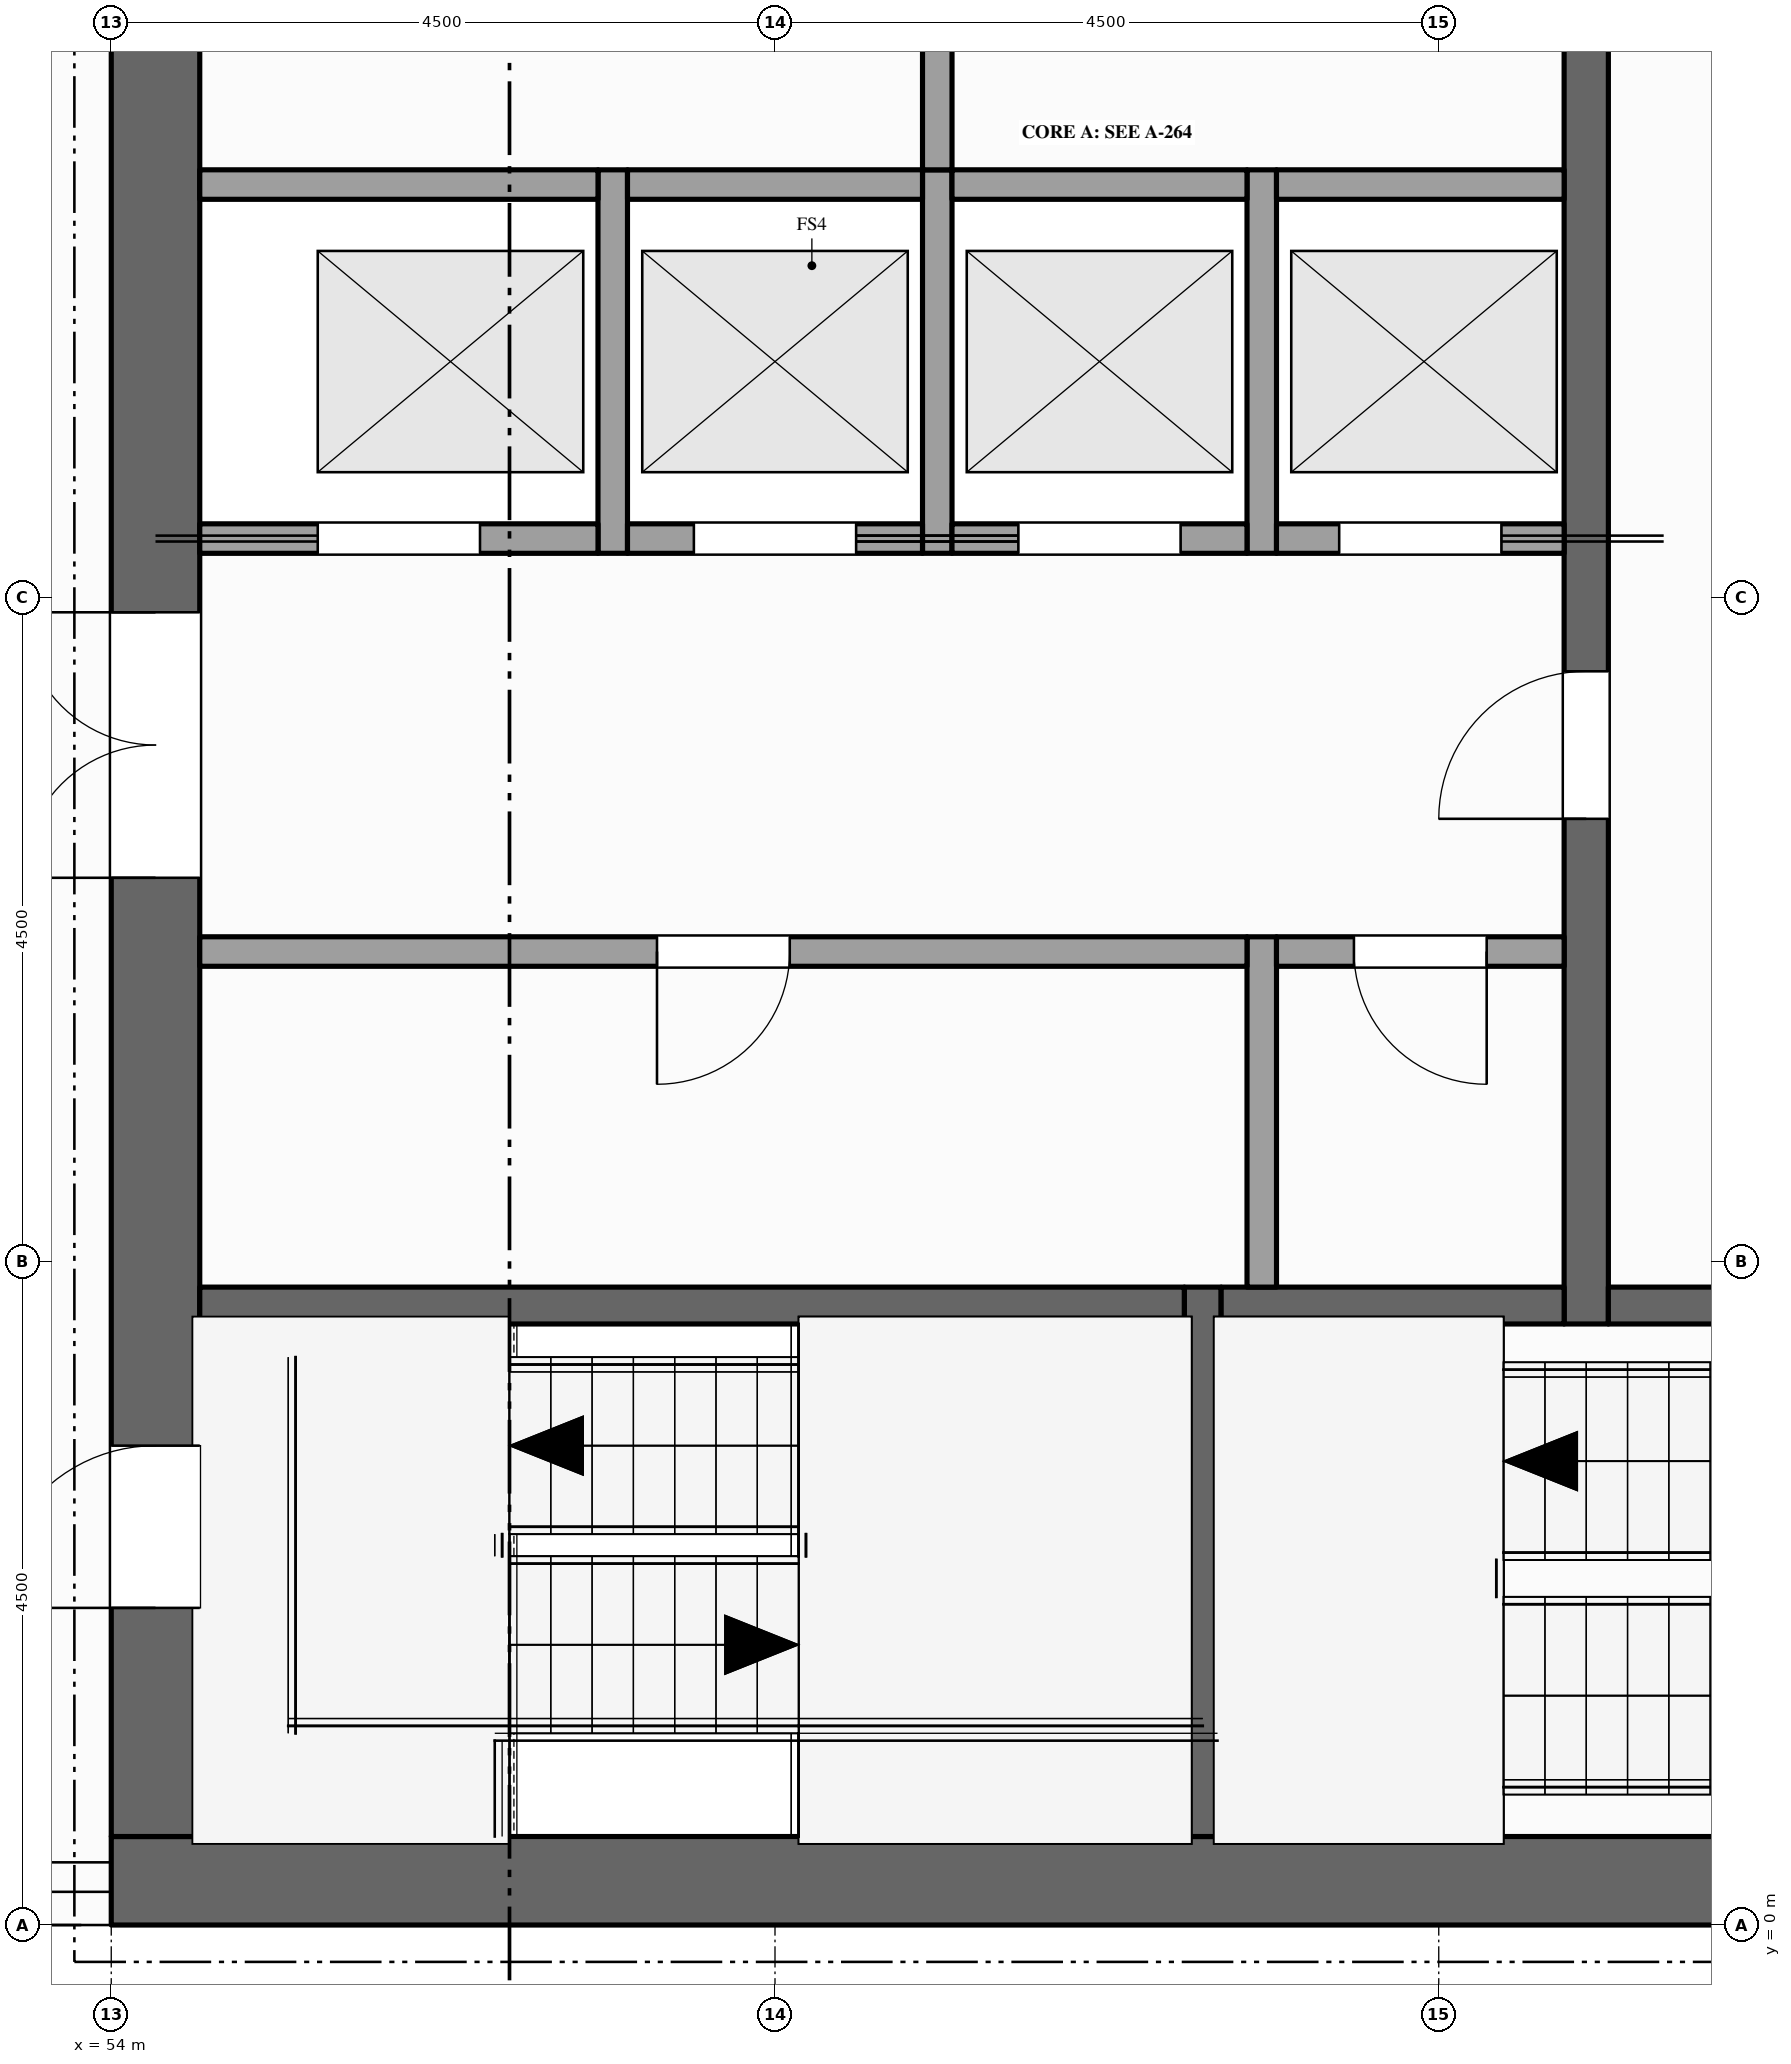
"""IFC4 building model, lengths in metres.
Left out: names, types, materials, properties, quantities, classifications, styles, units other than length and angle.
Written with IfcOpenShell. Run it as: python <this file> out.ifc"""

import sys

from ifc_helpers import new_model, si_unit, direction, frame, frame_2d, origin, place, context, subcontext, project, spatial, rectangle, extrude, element, fill, save


model = new_model("IFC4")
c1 = context("Model", 3, precision=1e-05, world=origin(), true_north=direction((0.0, 1.0)))
c2 = subcontext(c1, "Body", "Model", "MODEL_VIEW")
j1 = project(units=[si_unit("LENGTHUNIT", "METRE"), si_unit("PLANEANGLEUNIT", "RADIAN")], contexts=[c1])
p1 = place(None, origin())
s1 = spatial("IfcSite", under=j1, at=p1, CompositionType="ELEMENT")
p2 = place(p1, origin())
s2 = spatial("IfcBuilding", under=s1, at=p2, CompositionType="ELEMENT")
p3 = place(p2, frame((0.0, 0.0, 350.5)))
s3 = spatial("IfcBuildingStorey", under=s2, at=p3, CompositionType="ELEMENT", Elevation=350.5)
p4 = place(p3, frame((67.5, 0.3, -0.15), z_axis=(0.0, 0.0, 1.0), x_axis=(-1.0, 0.0, 0.0)))
e1 = element("IfcWall", 1, at=p4, inside=s3, PredefinedType="SHEAR", context=c2, shape_type="SweptSolid", body=[
    extrude(rectangle(XDim=13.5, YDim=0.6, at=frame_2d((6.75, 0.0))), origin(), (0.0, 0.0, 1.0), 5.0),
])
p5 = place(p3, frame((54.3, 0.6, -0.15), z_axis=(0.0, 0.0, 1.0), x_axis=(0.0, 1.0, 0.0)))
e2 = element("IfcWall", 2, at=p5, inside=s3, PredefinedType="SHEAR", context=c2, shape_type="SweptSolid", body=[
    extrude(rectangle(XDim=21.3, YDim=0.6, at=frame_2d((10.65, 0.0))), origin(), (0.0, 0.0, 1.0), 5.0),
])
p6 = place(p5, frame((6.5, 0.0, 0.15)))
e3 = element("IfcOpeningElement", 3, at=p6, cuts=e2, PredefinedType="OPENING", context=c2, shape_type="SweptSolid", body=[
    extrude(rectangle(XDim=1.8, YDim=2.1, at=frame_2d((0.9, 1.05))), frame((0.0, 0.31, 0.0), z_axis=(0.0, -1.0, 0.0), x_axis=(1.0, 0.0, 0.0)), (0.0, 0.0, 1.0), 0.62),
])
p7 = place(p5, frame((12.55, 0.0, 0.15)))
e4 = element("IfcOpeningElement", 4, at=p7, cuts=e2, PredefinedType="OPENING", context=c2, shape_type="SweptSolid", body=[
    extrude(rectangle(XDim=1.1, YDim=2.1, at=frame_2d((0.55, 1.05))), frame((0.0, 0.31, 0.0), z_axis=(0.0, -1.0, 0.0), x_axis=(1.0, 0.0, 0.0)), (0.0, 0.0, 1.0), 0.62),
])
p8 = place(p5, frame((1.55, 0.0, 0.15)))
e5 = element("IfcOpeningElement", 5, at=p8, cuts=e2, PredefinedType="OPENING", context=c2, shape_type="SweptSolid", body=[
    extrude(rectangle(XDim=1.1, YDim=2.1, at=frame_2d((0.55, 1.05))), frame((0.0, 0.31, 0.0), z_axis=(0.0, -1.0, 0.0), x_axis=(1.0, 0.0, 0.0)), (0.0, 0.0, 1.0), 0.62),
])
p9 = place(p5, frame((18.75, 0.0, 0.15)))
e6 = element("IfcOpeningElement", 6, at=p9, cuts=e2, PredefinedType="OPENING", context=c2, shape_type="SweptSolid", body=[
    extrude(rectangle(XDim=1.1, YDim=2.1, at=frame_2d((0.55, 1.05))), frame((0.0, 0.31, 0.0), z_axis=(0.0, -1.0, 0.0), x_axis=(1.0, 0.0, 0.0)), (0.0, 0.0, 1.0), 0.62),
])
for number, where, z_axis, x_axis in (
    (7, (57.4, 9.3, 0.0), (0.0, 0.0, 1.0), (0.0, 1.0, 0.0)),
    (8, (59.6, 9.3, 0.0), (0.0, 0.0, 1.0), (0.0, 1.0, 0.0)),
):
    element("IfcWall", number, at=place(p3, frame(where, z_axis=z_axis, x_axis=x_axis)), inside=s3, PredefinedType="SOLIDWALL", context=c2, shape_type="SweptSolid", body=[
        extrude(rectangle(XDim=2.6, YDim=0.2, at=frame_2d((1.3, 0.0))), origin(), (0.0, 0.0, 1.0), 4.75),
    ])
p10 = place(p3, frame((59.6, 11.9, 0.0), z_axis=(0.0, 0.0, 1.0), x_axis=(0.0, 1.0, 0.0)))
e9 = element("IfcWall", 9, at=p10, inside=s3, PredefinedType="PARTITIONING", context=c2, shape_type="SweptSolid", body=[
    extrude(rectangle(XDim=3.6, YDim=0.2, at=frame_2d((1.8, 0.0))), origin(), (0.0, 0.0, 1.0), 4.75),
])
p11 = place(p10, frame((1.3, 0.0, 0.0)))
e10 = element("IfcOpeningElement", 10, at=p11, cuts=e9, PredefinedType="OPENING", context=c2, shape_type="SweptSolid", body=[
    extrude(rectangle(XDim=1.0, YDim=2.1, at=frame_2d((0.5, 1.05))), frame((0.0, 0.11, 0.0), z_axis=(0.0, -1.0, 0.0), x_axis=(1.0, 0.0, 0.0)), (0.0, 0.0, 1.0), 0.22),
])
p12 = place(p3, frame((61.4, 0.6, 0.0), z_axis=(0.0, 0.0, 1.0), x_axis=(0.0, 1.0, 0.0)))
e11 = element("IfcWall", 11, at=p12, inside=s3, PredefinedType="SHEAR", context=c2, shape_type="SweptSolid", body=[
    extrude(rectangle(XDim=3.725, YDim=0.25, at=frame_2d((1.862, 0.0))), origin(), (0.0, 0.0, 1.0), 4.75),
])
p13 = place(p3, frame((61.8, 4.325, 0.0), z_axis=(0.0, 0.0, 1.0), x_axis=(0.0, 1.0, 0.0)))
e12 = element("IfcWall", 12, at=p13, inside=s3, PredefinedType="PARTITIONING", context=c2, shape_type="SweptSolid", body=[
    extrude(rectangle(XDim=2.375, YDim=0.2, at=frame_2d((1.188, 0.0))), origin(), (0.0, 0.0, 1.0), 4.75),
])
p14 = place(p3, frame((61.8, 9.3, 0.0), z_axis=(0.0, 0.0, 1.0), x_axis=(0.0, 1.0, 0.0)))
e13 = element("IfcWall", 13, at=p14, inside=s3, PredefinedType="SOLIDWALL", context=c2, shape_type="SweptSolid", body=[
    extrude(rectangle(XDim=2.6, YDim=0.2, at=frame_2d((1.3, 0.0))), origin(), (0.0, 0.0, 1.0), 4.75),
])
p15 = place(p3, frame((64.0, 4.075, 0.0), z_axis=(0.0, 0.0, 1.0), x_axis=(0.0, 1.0, 0.0)))
e14 = element("IfcWall", 14, at=p15, inside=s3, PredefinedType="SHEAR", context=c2, shape_type="SweptSolid", body=[
    extrude(rectangle(XDim=14.525, YDim=0.3, at=frame_2d((7.263, 0.0))), origin(), (0.0, 0.0, 1.0), 4.75),
])
p16 = place(p15, frame((3.425, 0.0, 0.0)))
e15 = element("IfcOpeningElement", 15, at=p16, cuts=e14, PredefinedType="OPENING", context=c2, shape_type="SweptSolid", body=[
    extrude(rectangle(XDim=1.0, YDim=2.1, at=frame_2d((0.5, 1.05))), frame((0.0, 0.16, 0.0), z_axis=(0.0, -1.0, 0.0), x_axis=(1.0, 0.0, 0.0)), (0.0, 0.0, 1.0), 0.32),
])
p17 = place(p15, frame((9.125, 0.0, 0.0)))
e16 = element("IfcOpeningElement", 16, at=p17, cuts=e14, PredefinedType="OPENING", context=c2, shape_type="SweptSolid", body=[
    extrude(rectangle(XDim=1.0, YDim=2.1, at=frame_2d((0.5, 1.05))), frame((0.0, 0.16, 0.0), z_axis=(0.0, -1.0, 0.0), x_axis=(1.0, 0.0, 0.0)), (0.0, 0.0, 1.0), 0.32),
])
p18 = place(p3, frame((54.6, 4.2, 0.0), z_axis=(0.0, 0.0, 1.0), x_axis=(1.0, 0.0, 0.0)))
e17 = element("IfcWall", 17, at=p18, inside=s3, PredefinedType="SHEAR", context=c2, shape_type="SweptSolid", body=[
    extrude(rectangle(XDim=6.675, YDim=0.25, at=frame_2d((3.337, 0.0))), origin(), (0.0, 0.0, 1.0), 4.75),
])
p19 = place(p3, frame((61.525, 4.2, 0.0), z_axis=(0.0, 0.0, 1.0), x_axis=(1.0, 0.0, 0.0)))
e18 = element("IfcWall", 18, at=p19, inside=s3, PredefinedType="SHEAR", context=c2, shape_type="SweptSolid", body=[
    extrude(rectangle(XDim=2.325, YDim=0.25, at=frame_2d((1.163, 0.0))), origin(), (0.0, 0.0, 1.0), 4.75),
])
p20 = place(p3, frame((64.15, 4.2, 0.0), z_axis=(0.0, 0.0, 1.0), x_axis=(1.0, 0.0, 0.0)))
e19 = element("IfcWall", 19, at=p20, inside=s3, PredefinedType="SHEAR", context=c2, shape_type="SweptSolid", body=[
    extrude(rectangle(XDim=2.75, YDim=0.25, at=frame_2d((1.375, 0.0))), origin(), (0.0, 0.0, 1.0), 4.75),
])
p21 = place(p20, frame((1.4, 0.0, 0.0)))
e20 = element("IfcOpeningElement", 20, at=p21, cuts=e19, PredefinedType="OPENING", context=c2, shape_type="SweptSolid", body=[
    extrude(rectangle(XDim=1.1, YDim=2.1, at=frame_2d((0.55, 1.05))), frame((0.0, 0.135, 0.0), z_axis=(0.0, -1.0, 0.0), x_axis=(1.0, 0.0, 0.0)), (0.0, 0.0, 1.0), 0.27),
])
p22 = place(p3, frame((54.6, 6.6, 0.0), z_axis=(0.0, 0.0, 1.0), x_axis=(1.0, 0.0, 0.0)))
e21 = element("IfcWall", 21, at=p22, inside=s3, PredefinedType="PARTITIONING", context=c2, shape_type="SweptSolid", body=[
    extrude(rectangle(XDim=7.1, YDim=0.2, at=frame_2d((3.55, 0.0))), origin(), (0.0, 0.0, 1.0), 4.75),
])
p23 = place(p22, frame((3.1, 0.0, 0.0)))
e22 = element("IfcOpeningElement", 22, at=p23, cuts=e21, PredefinedType="OPENING", context=c2, shape_type="SweptSolid", body=[
    extrude(rectangle(XDim=0.9, YDim=2.1, at=frame_2d((0.45, 1.05))), frame((0.0, 0.11, 0.0), z_axis=(0.0, -1.0, 0.0), x_axis=(1.0, 0.0, 0.0)), (0.0, 0.0, 1.0), 0.22),
])
p24 = place(p3, frame((61.9, 6.6, 0.0), z_axis=(0.0, 0.0, 1.0), x_axis=(1.0, 0.0, 0.0)))
e23 = element("IfcWall", 23, at=p24, inside=s3, PredefinedType="PARTITIONING", context=c2, shape_type="SweptSolid", body=[
    extrude(rectangle(XDim=1.95, YDim=0.2, at=frame_2d((0.975, 0.0))), origin(), (0.0, 0.0, 1.0), 4.75),
])
p25 = place(p24, frame((0.525, 0.0, 0.0)))
e24 = element("IfcOpeningElement", 24, at=p25, cuts=e23, PredefinedType="OPENING", context=c2, shape_type="SweptSolid", body=[
    extrude(rectangle(XDim=0.9, YDim=2.1, at=frame_2d((0.45, 1.05))), frame((0.0, 0.11, 0.0), z_axis=(0.0, -1.0, 0.0), x_axis=(1.0, 0.0, 0.0)), (0.0, 0.0, 1.0), 0.22),
])
p26 = place(p3, frame((54.6, 9.4, 0.0), z_axis=(0.0, 0.0, 1.0), x_axis=(1.0, 0.0, 0.0)))
e25 = element("IfcWall", 25, at=p26, inside=s3, PredefinedType="SOLIDWALL", context=c2, shape_type="SweptSolid", body=[
    extrude(rectangle(XDim=2.7, YDim=0.2, at=frame_2d((1.35, 0.0))), origin(), (0.0, 0.0, 1.0), 4.75),
])
p27 = place(p26, frame((0.8, 0.0, 0.012)))
e26 = element("IfcOpeningElement", 26, at=p27, cuts=e25, PredefinedType="OPENING", context=c2, shape_type="SweptSolid", body=[
    extrude(rectangle(XDim=1.1, YDim=2.1, at=frame_2d((0.55, 1.05))), frame((0.0, 0.11, 0.0), z_axis=(0.0, -1.0, 0.0), x_axis=(1.0, 0.0, 0.0)), (0.0, 0.0, 1.0), 0.22),
])
p28 = place(p3, frame((57.5, 9.4, 0.0), z_axis=(0.0, 0.0, 1.0), x_axis=(1.0, 0.0, 0.0)))
e27 = element("IfcWall", 27, at=p28, inside=s3, PredefinedType="SOLIDWALL", context=c2, shape_type="SweptSolid", body=[
    extrude(rectangle(XDim=2.0, YDim=0.2, at=frame_2d((1.0, 0.0))), origin(), (0.0, 0.0, 1.0), 4.75),
])
p29 = place(p28, frame((0.45, 0.0, 0.012)))
e28 = element("IfcOpeningElement", 28, at=p29, cuts=e27, PredefinedType="OPENING", context=c2, shape_type="SweptSolid", body=[
    extrude(rectangle(XDim=1.1, YDim=2.1, at=frame_2d((0.55, 1.05))), frame((0.0, 0.11, 0.0), z_axis=(0.0, -1.0, 0.0), x_axis=(1.0, 0.0, 0.0)), (0.0, 0.0, 1.0), 0.22),
])
p30 = place(p3, frame((59.7, 9.4, 0.0), z_axis=(0.0, 0.0, 1.0), x_axis=(1.0, 0.0, 0.0)))
e29 = element("IfcWall", 29, at=p30, inside=s3, PredefinedType="SOLIDWALL", context=c2, shape_type="SweptSolid", body=[
    extrude(rectangle(XDim=2.0, YDim=0.2, at=frame_2d((1.0, 0.0))), origin(), (0.0, 0.0, 1.0), 4.75),
])
p31 = place(p30, frame((0.45, 0.0, 0.012)))
e30 = element("IfcOpeningElement", 30, at=p31, cuts=e29, PredefinedType="OPENING", context=c2, shape_type="SweptSolid", body=[
    extrude(rectangle(XDim=1.1, YDim=2.1, at=frame_2d((0.55, 1.05))), frame((0.0, 0.11, 0.0), z_axis=(0.0, -1.0, 0.0), x_axis=(1.0, 0.0, 0.0)), (0.0, 0.0, 1.0), 0.22),
])
p32 = place(p3, frame((61.9, 9.4, 0.0), z_axis=(0.0, 0.0, 1.0), x_axis=(1.0, 0.0, 0.0)))
e31 = element("IfcWall", 31, at=p32, inside=s3, PredefinedType="SOLIDWALL", context=c2, shape_type="SweptSolid", body=[
    extrude(rectangle(XDim=1.95, YDim=0.2, at=frame_2d((0.975, 0.0))), origin(), (0.0, 0.0, 1.0), 4.75),
])
p33 = place(p32, frame((0.425, 0.0, 0.012)))
e32 = element("IfcOpeningElement", 32, at=p33, cuts=e31, PredefinedType="OPENING", context=c2, shape_type="SweptSolid", body=[
    extrude(rectangle(XDim=1.1, YDim=2.1, at=frame_2d((0.55, 1.05))), frame((0.0, 0.11, 0.0), z_axis=(0.0, -1.0, 0.0), x_axis=(1.0, 0.0, 0.0)), (0.0, 0.0, 1.0), 0.22),
])
p34 = place(p3, frame((54.6, 11.8, 0.0), z_axis=(0.0, 0.0, 1.0), x_axis=(1.0, 0.0, 0.0)))
e33 = element("IfcWall", 33, at=p34, inside=s3, PredefinedType="SOLIDWALL", context=c2, shape_type="SweptSolid", body=[
    extrude(rectangle(XDim=2.7, YDim=0.2, at=frame_2d((1.35, 0.0))), origin(), (0.0, 0.0, 1.0), 4.75),
])
for number, where, z_axis, x_axis in (
    (34, (57.5, 11.8, 0.0), (0.0, 0.0, 1.0), (1.0, 0.0, 0.0)),
    (35, (59.7, 11.8, 0.0), (0.0, 0.0, 1.0), (1.0, 0.0, 0.0)),
):
    element("IfcWall", number, at=place(p3, frame(where, z_axis=z_axis, x_axis=x_axis)), inside=s3, PredefinedType="SOLIDWALL", context=c2, shape_type="SweptSolid", body=[
        extrude(rectangle(XDim=2.0, YDim=0.2, at=frame_2d((1.0, 0.0))), origin(), (0.0, 0.0, 1.0), 4.75),
    ])
p35 = place(p3, frame((61.9, 11.8, 0.0), z_axis=(0.0, 0.0, 1.0), x_axis=(1.0, 0.0, 0.0)))
e36 = element("IfcWall", 36, at=p35, inside=s3, PredefinedType="SOLIDWALL", context=c2, shape_type="SweptSolid", body=[
    extrude(rectangle(XDim=1.95, YDim=0.2, at=frame_2d((0.975, 0.0))), origin(), (0.0, 0.0, 1.0), 4.75),
])
p36 = place(p27, origin())
e37 = element("IfcDoor", 37, at=p36, inside=s3, OperationType="SLIDING_TO_LEFT", PredefinedType="DOOR", context=c2, shape_type="SweptSolid", body=[
    extrude(rectangle(XDim=1.1, YDim=2.1, at=frame_2d((0.55, 1.05))), frame((0.0, 0.025, 0.0), z_axis=(0.0, -1.0, 0.0), x_axis=(1.0, 0.0, 0.0)), (0.0, 0.0, 1.0), 0.05),
])
fill(e26, e37)
p37 = place(p29, origin())
e38 = element("IfcDoor", 38, at=p37, inside=s3, OperationType="SLIDING_TO_RIGHT", PredefinedType="DOOR", context=c2, shape_type="SweptSolid", body=[
    extrude(rectangle(XDim=1.1, YDim=2.1, at=frame_2d((0.55, 1.05))), frame((0.0, 0.025, 0.0), z_axis=(0.0, -1.0, 0.0), x_axis=(1.0, 0.0, 0.0)), (0.0, 0.0, 1.0), 0.05),
])
fill(e28, e38)
p38 = place(p31, origin())
e39 = element("IfcDoor", 39, at=p38, inside=s3, OperationType="SLIDING_TO_LEFT", PredefinedType="DOOR", context=c2, shape_type="SweptSolid", body=[
    extrude(rectangle(XDim=1.1, YDim=2.1, at=frame_2d((0.55, 1.05))), frame((0.0, 0.025, 0.0), z_axis=(0.0, -1.0, 0.0), x_axis=(1.0, 0.0, 0.0)), (0.0, 0.0, 1.0), 0.05),
])
fill(e30, e39)
p39 = place(p33, origin())
e40 = element("IfcDoor", 40, at=p39, inside=s3, OperationType="SLIDING_TO_RIGHT", PredefinedType="DOOR", context=c2, shape_type="SweptSolid", body=[
    extrude(rectangle(XDim=1.1, YDim=2.1, at=frame_2d((0.55, 1.05))), frame((0.0, 0.025, 0.0), z_axis=(0.0, -1.0, 0.0), x_axis=(1.0, 0.0, 0.0)), (0.0, 0.0, 1.0), 0.05),
])
fill(e32, e40)
p40 = place(p6, origin())
e41 = element("IfcDoor", 41, at=p40, inside=s3, OperationType="DOUBLE_DOOR_SINGLE_SWING", PredefinedType="DOOR", context=c2, shape_type="SweptSolid", body=[
    extrude(rectangle(XDim=1.8, YDim=2.1, at=frame_2d((0.9, 1.05))), frame((0.0, 0.025, 0.0), z_axis=(0.0, -1.0, 0.0), x_axis=(1.0, 0.0, 0.0)), (0.0, 0.0, 1.0), 0.05),
])
fill(e3, e41)
p41 = place(p16, origin())
e42 = element("IfcDoor", 42, at=p41, inside=s3, OperationType="SINGLE_SWING_LEFT", PredefinedType="DOOR", context=c2, shape_type="SweptSolid", body=[
    extrude(rectangle(XDim=1.0, YDim=2.1, at=frame_2d((0.5, 1.05))), frame((0.0, 0.025, 0.0), z_axis=(0.0, -1.0, 0.0), x_axis=(1.0, 0.0, 0.0)), (0.0, 0.0, 1.0), 0.05),
])
fill(e15, e42)
p42 = place(p8, origin())
e43 = element("IfcDoor", 43, at=p42, inside=s3, OperationType="SINGLE_SWING_LEFT", PredefinedType="DOOR", context=c2, shape_type="SweptSolid", body=[
    extrude(rectangle(XDim=1.1, YDim=2.1, at=frame_2d((0.55, 1.05))), frame((0.0, 0.025, 0.0), z_axis=(0.0, -1.0, 0.0), x_axis=(1.0, 0.0, 0.0)), (0.0, 0.0, 1.0), 0.05),
])
fill(e5, e43)
p43 = place(p23, origin())
e44 = element("IfcDoor", 44, at=p43, inside=s3, OperationType="SINGLE_SWING_LEFT", PredefinedType="DOOR", context=c2, shape_type="SweptSolid", body=[
    extrude(rectangle(XDim=0.9, YDim=2.1, at=frame_2d((0.45, 1.05))), frame((0.0, 0.025, 0.0), z_axis=(0.0, -1.0, 0.0), x_axis=(1.0, 0.0, 0.0)), (0.0, 0.0, 1.0), 0.05),
])
fill(e22, e44)
p44 = place(p25, origin())
e45 = element("IfcDoor", 45, at=p44, inside=s3, OperationType="SINGLE_SWING_RIGHT", PredefinedType="DOOR", context=c2, shape_type="SweptSolid", body=[
    extrude(rectangle(XDim=0.9, YDim=2.1, at=frame_2d((0.45, 1.05))), frame((0.0, 0.025, 0.0), z_axis=(0.0, -1.0, 0.0), x_axis=(1.0, 0.0, 0.0)), (0.0, 0.0, 1.0), 0.05),
])
fill(e24, e45)
save(model, sys.argv[1])
